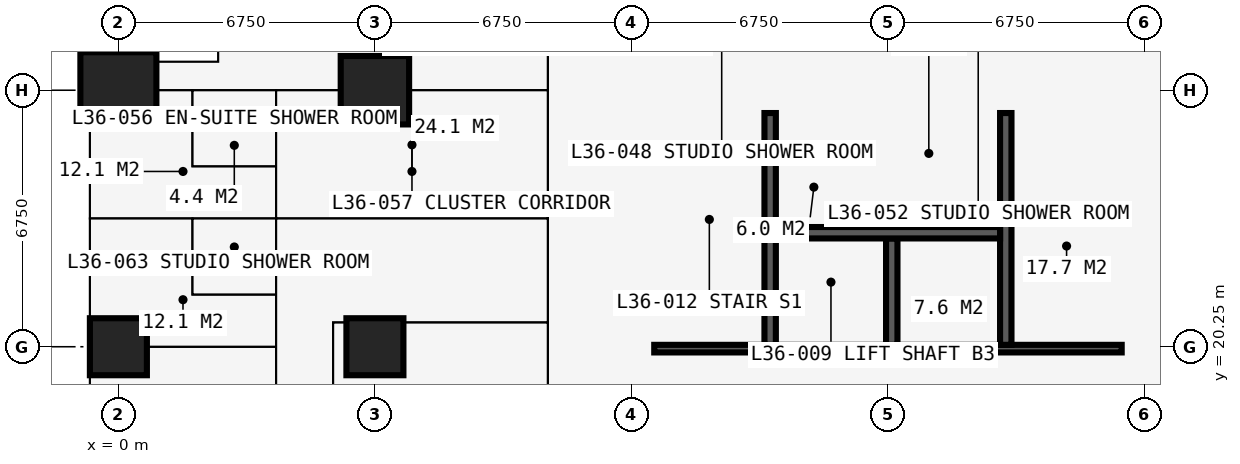
"""IFC4 building model, lengths in metres.
Left out: names, types, materials, properties, quantities, classifications, styles, units other than length and angle.
Written with IfcOpenShell. Run it as: python <this file> out.ifc"""

import sys

from ifc_helpers import new_model, si_unit, direction, frame, frame_2d, origin, origin_2d, place, context, subcontext, project, spatial, rectangle, extrude, element, fill, save


model = new_model("IFC4")
c1 = context("Model", 3, precision=1e-05, world=origin(), true_north=direction((0.0, 1.0)))
c2 = subcontext(c1, "Body", "Model", "MODEL_VIEW")
j1 = project(units=[si_unit("LENGTHUNIT", "METRE"), si_unit("PLANEANGLEUNIT", "RADIAN")], contexts=[c1])
p1 = place(None, origin())
s1 = spatial("IfcSite", under=j1, at=p1, CompositionType="ELEMENT")
p2 = place(p1, origin())
s2 = spatial("IfcBuilding", under=s1, at=p2, CompositionType="ELEMENT")
p3 = place(p2, frame((0.0, 0.0, 134.1)))
s3 = spatial("IfcBuildingStorey", under=s2, at=p3, CompositionType="ELEMENT", Elevation=134.1)
p4 = place(p3, frame((0.0, 20.25, 0.0), z_axis=(0.0, 0.0, 1.0), x_axis=(1.0, 0.0, 0.0)))
e1 = element("IfcColumn", 1, at=p4, inside=s3, PredefinedType="COLUMN", context=c2, shape_type="SweptSolid", body=[
    extrude(rectangle(XDim=1.5, YDim=1.5, at=origin_2d()), origin(), (0.0, 0.0, 1.0), 3.6),
])
p5 = place(p3, frame((0.0, 27.0, 0.0), z_axis=(0.0, 0.0, 1.0), x_axis=(1.0, 0.0, 0.0)))
e2 = element("IfcColumn", 2, at=p5, inside=s3, PredefinedType="COLUMN", context=c2, shape_type="SweptSolid", body=[
    extrude(rectangle(XDim=2.0, YDim=2.0, at=origin_2d()), origin(), (0.0, 0.0, 1.0), 3.6),
])
p6 = place(p3, frame((6.75, 20.25, 0.0), z_axis=(0.0, 0.0, 1.0), x_axis=(1.0, 0.0, 0.0)))
e3 = element("IfcColumn", 3, at=p6, inside=s3, PredefinedType="COLUMN", context=c2, shape_type="SweptSolid", body=[
    extrude(rectangle(XDim=1.5, YDim=1.5, at=origin_2d()), origin(), (0.0, 0.0, 1.0), 3.6),
])
p7 = place(p3, frame((6.75, 27.0, 0.0), z_axis=(0.0, 0.0, 1.0), x_axis=(1.0, 0.0, 0.0)))
e4 = element("IfcColumn", 4, at=p7, inside=s3, PredefinedType="COLUMN", context=c2, shape_type="SweptSolid", body=[
    extrude(rectangle(XDim=1.8, YDim=1.8, at=origin_2d()), origin(), (0.0, 0.0, 1.0), 3.6),
])
p8 = place(p3, frame((27.0, 14.1, 0.0), z_axis=(0.0, 0.0, 1.0), x_axis=(0.0, 1.0, 0.0)))
e5 = element("IfcWall", 5, at=p8, inside=s3, PredefinedType="SHEAR", context=c2, shape_type="SweptSolid", body=[
    extrude(rectangle(XDim=12.3, YDim=1.2, at=frame_2d((6.15, 0.0))), origin(), (0.0, 0.0, 1.0), 3.6),
])
p9 = place(p8, frame((3.65, 0.0, 0.0)))
e6 = element("IfcOpeningElement", 6, at=p9, cuts=e5, PredefinedType="OPENING", context=c2, shape_type="SweptSolid", body=[
    extrude(rectangle(XDim=1.2, YDim=2.2, at=frame_2d((0.6, 1.1))), frame((0.0, 0.61, 0.0), z_axis=(0.0, -1.0, 0.0), x_axis=(1.0, 0.0, 0.0)), (0.0, 0.0, 1.0), 1.22),
])
p10 = place(p3, frame((27.6, 27.0, 0.0), z_axis=(0.0, 0.0, 1.0), x_axis=(-1.0, 0.0, 0.0)))
e7 = element("IfcWall", 7, at=p10, inside=s3, PredefinedType="SHEAR", context=c2, shape_type="SweptSolid", body=[
    extrude(rectangle(XDim=14.7, YDim=1.2, at=frame_2d((7.35, 0.0))), origin(), (0.0, 0.0, 1.0), 3.6),
])
p11 = place(p10, frame((5.225, 0.0, 0.0)))
e8 = element("IfcOpeningElement", 8, at=p11, cuts=e7, PredefinedType="OPENING", context=c2, shape_type="SweptSolid", body=[
    extrude(rectangle(XDim=0.9, YDim=2.2, at=frame_2d((0.45, 1.1))), frame((0.0, 0.61, 0.0), z_axis=(0.0, -1.0, 0.0), x_axis=(1.0, 0.0, 0.0)), (0.0, 0.0, 1.0), 1.22),
])
p12 = place(p10, frame((8.2, 0.0, 0.0)))
e9 = element("IfcOpeningElement", 9, at=p12, cuts=e7, PredefinedType="OPENING", context=c2, shape_type="SweptSolid", body=[
    extrude(rectangle(XDim=1.0, YDim=2.2, at=frame_2d((0.5, 1.1))), frame((0.0, 0.61, 0.0), z_axis=(0.0, -1.0, 0.0), x_axis=(1.0, 0.0, 0.0)), (0.0, 0.0, 1.0), 1.22),
])
p13 = place(p3, frame((13.5, 26.4, 0.0), z_axis=(0.0, 0.0, 1.0), x_axis=(0.0, -1.0, 0.0)))
e10 = element("IfcWall", 10, at=p13, inside=s3, PredefinedType="SHEAR", context=c2, shape_type="SweptSolid", body=[
    extrude(rectangle(XDim=12.3, YDim=1.2, at=frame_2d((6.15, 0.0))), origin(), (0.0, 0.0, 1.0), 3.6),
])
p14 = place(p13, frame((7.45, 0.0, 0.0)))
e11 = element("IfcOpeningElement", 11, at=p14, cuts=e10, PredefinedType="OPENING", context=c2, shape_type="SweptSolid", body=[
    extrude(rectangle(XDim=1.2, YDim=2.2, at=frame_2d((0.6, 1.1))), frame((0.0, 0.61, 0.0), z_axis=(0.0, -1.0, 0.0), x_axis=(1.0, 0.0, 0.0)), (0.0, 0.0, 1.0), 1.22),
])
p15 = place(p3, frame((2.625, 31.125, 0.0), z_axis=(0.0, 0.0, 1.0), x_axis=(0.0, -1.0, 0.0)))
e12 = element("IfcWall", 12, at=p15, inside=s3, PredefinedType="SOLIDWALL", context=c2, shape_type="SweptSolid", body=[
    extrude(rectangle(XDim=3.375, YDim=0.3, at=frame_2d((1.688, 0.0))), origin(), (0.0, 0.0, 1.0), 3.3),
])
p16 = place(p15, frame((0.788, 0.0, 0.6)))
e13 = element("IfcOpeningElement", 13, at=p16, cuts=e12, PredefinedType="OPENING", context=c2, shape_type="SweptSolid", body=[
    extrude(rectangle(XDim=1.8, YDim=2.1, at=frame_2d((0.9, 1.05))), frame((0.0, 0.16, 0.0), z_axis=(0.0, -1.0, 0.0), x_axis=(1.0, 0.0, 0.0)), (0.0, 0.0, 1.0), 0.32),
])
p17 = place(p3, frame((2.625, 27.75, 0.0), z_axis=(0.0, 0.0, 1.0), x_axis=(-1.0, 0.0, 0.0)))
e14 = element("IfcWall", 14, at=p17, inside=s3, PredefinedType="SOLIDWALL", context=c2, shape_type="SweptSolid", body=[
    extrude(rectangle(XDim=3.375, YDim=0.3, at=frame_2d((1.688, 0.0))), origin(), (0.0, 0.0, 1.0), 3.3),
])
p18 = place(p17, frame((0.292, 0.0, 0.9)))
e15 = element("IfcOpeningElement", 15, at=p18, cuts=e14, PredefinedType="OPENING", context=c2, shape_type="SweptSolid", body=[
    extrude(rectangle(XDim=1.2, YDim=1.8, at=frame_2d((0.6, 0.9))), frame((0.0, 0.16, 0.0), z_axis=(0.0, -1.0, 0.0), x_axis=(1.0, 0.0, 0.0)), (0.0, 0.0, 1.0), 0.32),
])
p19 = place(p3, frame((14.1, 20.2, 0.0), z_axis=(0.0, 0.0, 1.0), x_axis=(1.0, 0.0, 0.0)))
e16 = element("IfcWall", 16, at=p19, inside=s3, PredefinedType="SHEAR", context=c2, shape_type="SweptSolid", body=[
    extrude(rectangle(XDim=12.3, YDim=0.2, at=frame_2d((6.15, 0.0))), origin(), (0.0, 0.0, 1.0), 3.6),
])
p20 = place(p19, frame((0.35, 0.0, 0.0)))
e17 = element("IfcOpeningElement", 17, at=p20, cuts=e16, PredefinedType="OPENING", context=c2, shape_type="SweptSolid", body=[
    extrude(rectangle(XDim=1.1, YDim=2.2, at=frame_2d((0.55, 1.1))), frame((0.0, 0.11, 0.0), z_axis=(0.0, -1.0, 0.0), x_axis=(1.0, 0.0, 0.0)), (0.0, 0.0, 1.0), 0.22),
])
p21 = place(p19, frame((9.75, 0.0, 0.0)))
e18 = element("IfcOpeningElement", 18, at=p21, cuts=e16, PredefinedType="OPENING", context=c2, shape_type="SweptSolid", body=[
    extrude(rectangle(XDim=1.1, YDim=2.2, at=frame_2d((0.55, 1.1))), frame((0.0, 0.11, 0.0), z_axis=(0.0, -1.0, 0.0), x_axis=(1.0, 0.0, 0.0)), (0.0, 0.0, 1.0), 0.22),
])
for number, where, z_axis, x_axis in (
    (19, (17.15, 20.3, 0.0), (0.0, 0.0, 1.0), (0.0, 1.0, 0.0)),
    (20, (23.35, 20.3, 0.0), (0.0, 0.0, 1.0), (0.0, 1.0, 0.0)),
):
    element("IfcWall", number, at=place(p3, frame(where, z_axis=z_axis, x_axis=x_axis)), inside=s3, PredefinedType="SHEAR", context=c2, shape_type="SweptSolid", body=[
        extrude(rectangle(XDim=6.1, YDim=0.3, at=frame_2d((3.05, 0.0))), origin(), (0.0, 0.0, 1.0), 3.6),
    ])
p22 = place(p3, frame((20.35, 20.3, 0.0), z_axis=(0.0, 0.0, 1.0), x_axis=(0.0, 1.0, 0.0)))
e21 = element("IfcWall", 21, at=p22, inside=s3, PredefinedType="SHEAR", context=c2, shape_type="SweptSolid", body=[
    extrude(rectangle(XDim=2.8, YDim=0.3, at=frame_2d((1.4, 0.0))), origin(), (0.0, 0.0, 1.0), 3.6),
])
p23 = place(p3, frame((17.3, 23.25, 0.0), z_axis=(0.0, 0.0, 1.0), x_axis=(1.0, 0.0, 0.0)))
e22 = element("IfcWall", 22, at=p23, inside=s3, PredefinedType="SHEAR", context=c2, shape_type="SweptSolid", body=[
    extrude(rectangle(XDim=5.9, YDim=0.3, at=frame_2d((2.95, 0.0))), origin(), (0.0, 0.0, 1.0), 3.6),
])
p24 = place(p3, frame((18.875, 16.6, 0.0), z_axis=(0.0, 0.0, 1.0), x_axis=(0.0, 1.0, 0.0)))
e23 = element("IfcWall", 23, at=p24, inside=s3, PredefinedType="PARTITIONING", context=c2, shape_type="SweptSolid", body=[
    extrude(rectangle(XDim=3.5, YDim=0.15, at=frame_2d((1.75, 0.0))), origin(), (0.0, 0.0, 1.0), 3.3),
])
p25 = place(p24, frame((1.15, 0.0, 0.0)))
e24 = element("IfcOpeningElement", 24, at=p25, cuts=e23, PredefinedType="OPENING", context=c2, shape_type="SweptSolid", body=[
    extrude(rectangle(XDim=1.2, YDim=2.2, at=frame_2d((0.6, 1.1))), frame((0.0, 0.085, 0.0), z_axis=(0.0, -1.0, 0.0), x_axis=(1.0, 0.0, 0.0)), (0.0, 0.0, 1.0), 0.17),
])
p26 = place(p3, frame((21.625, 16.6, 0.0), z_axis=(0.0, 0.0, 1.0), x_axis=(0.0, 1.0, 0.0)))
e25 = element("IfcWall", 25, at=p26, inside=s3, PredefinedType="PARTITIONING", context=c2, shape_type="SweptSolid", body=[
    extrude(rectangle(XDim=3.5, YDim=0.15, at=frame_2d((1.75, 0.0))), origin(), (0.0, 0.0, 1.0), 3.3),
])
p27 = place(p26, frame((1.15, 0.0, 0.0)))
e26 = element("IfcOpeningElement", 26, at=p27, cuts=e25, PredefinedType="OPENING", context=c2, shape_type="SweptSolid", body=[
    extrude(rectangle(XDim=1.2, YDim=2.2, at=frame_2d((0.6, 1.1))), frame((0.0, 0.085, 0.0), z_axis=(0.0, -1.0, 0.0), x_axis=(1.0, 0.0, 0.0)), (0.0, 0.0, 1.0), 0.17),
])
p28 = place(p3, frame((20.12, 16.6, 0.0), z_axis=(0.0, 0.0, 1.0), x_axis=(0.0, 1.0, 0.0)))
e27 = element("IfcWall", 27, at=p28, inside=s3, PredefinedType="PARTITIONING", context=c2, shape_type="SweptSolid", body=[
    extrude(rectangle(XDim=3.5, YDim=0.15, at=frame_2d((1.75, 0.0))), origin(), (0.0, 0.0, 1.0), 3.3),
])
p29 = place(p3, frame((19.375, 23.4, 0.0), z_axis=(0.0, 0.0, 1.0), x_axis=(0.0, 1.0, 0.0)))
e28 = element("IfcWall", 28, at=p29, inside=s3, PredefinedType="PARTITIONING", context=c2, shape_type="SweptSolid", body=[
    extrude(rectangle(XDim=3.0, YDim=0.15, at=frame_2d((1.5, 0.0))), origin(), (0.0, 0.0, 1.0), 3.3),
])
p30 = place(p3, frame((19.45, 25.1, 0.0), z_axis=(0.0, 0.0, 1.0), x_axis=(1.0, 0.0, 0.0)))
e29 = element("IfcWall", 29, at=p30, inside=s3, PredefinedType="PARTITIONING", context=c2, shape_type="SweptSolid", body=[
    extrude(rectangle(XDim=3.75, YDim=0.15, at=frame_2d((1.875, 0.0))), origin(), (0.0, 0.0, 1.0), 3.3),
])
p31 = place(p30, frame((1.45, 0.0, 0.0)))
e30 = element("IfcOpeningElement", 30, at=p31, cuts=e29, PredefinedType="OPENING", context=c2, shape_type="SweptSolid", body=[
    extrude(rectangle(XDim=0.9, YDim=2.2, at=frame_2d((0.45, 1.1))), frame((0.0, 0.085, 0.0), z_axis=(0.0, -1.0, 0.0), x_axis=(1.0, 0.0, 0.0)), (0.0, 0.0, 1.0), 0.17),
])
p32 = place(p3, frame((-0.734, 20.25, 0.0), z_axis=(0.0, 0.0, 1.0), x_axis=(1.0, 0.0, 0.0)))
e31 = element("IfcWall", 31, at=p32, inside=s3, PredefinedType="PARTITIONING", context=c2, shape_type="SweptSolid", body=[
    extrude(rectangle(XDim=4.884, YDim=0.175, at=frame_2d((2.442, 0.0))), origin(), (0.0, 0.0, 1.0), 2.802),
])
p33 = place(p3, frame((-0.734, 23.625, 0.0), z_axis=(0.0, 0.0, 1.0), x_axis=(1.0, 0.0, 0.0)))
e32 = element("IfcWall", 32, at=p33, inside=s3, PredefinedType="PARTITIONING", context=c2, shape_type="SweptSolid", body=[
    extrude(rectangle(XDim=12.034, YDim=0.15, at=frame_2d((6.017, 0.0))), origin(), (0.0, 0.0, 1.0), 3.3),
])
p34 = place(p3, frame((-0.734, 27.0, 0.0), z_axis=(0.0, 0.0, 1.0), x_axis=(1.0, 0.0, 0.0)))
e33 = element("IfcWall", 33, at=p34, inside=s3, PredefinedType="PARTITIONING", context=c2, shape_type="SweptSolid", body=[
    extrude(rectangle(XDim=12.034, YDim=0.15, at=frame_2d((6.017, 0.0))), origin(), (0.0, 0.0, 1.0), 2.802),
])
p35 = place(p34, frame((8.434, 0.0, 0.0)))
e34 = element("IfcOpeningElement", 34, at=p35, cuts=e33, PredefinedType="OPENING", context=c2, shape_type="SweptSolid", body=[
    extrude(rectangle(XDim=1.0, YDim=2.2, at=frame_2d((0.5, 1.1))), frame((0.0, 0.085, 0.0), z_axis=(0.0, -1.0, 0.0), x_axis=(1.0, 0.0, 0.0)), (0.0, 0.0, 1.0), 0.17),
])
p36 = place(p3, frame((1.95, 21.625, 0.0), z_axis=(0.0, 0.0, 1.0), x_axis=(0.0, 1.0, 0.0)))
e35 = element("IfcWall", 35, at=p36, inside=s3, PredefinedType="PARTITIONING", context=c2, shape_type="SweptSolid", body=[
    extrude(rectangle(XDim=2.0, YDim=0.1, at=frame_2d((1.0, 0.0))), origin(), (0.0, 0.0, 1.0), 3.3),
])
p37 = place(p3, frame((1.95, 21.625, 0.0), z_axis=(0.0, 0.0, 1.0), x_axis=(1.0, 0.0, 0.0)))
e36 = element("IfcWall", 36, at=p37, inside=s3, PredefinedType="PARTITIONING", context=c2, shape_type="SweptSolid", body=[
    extrude(rectangle(XDim=2.2, YDim=0.1, at=frame_2d((1.1, 0.0))), origin(), (0.0, 0.0, 1.0), 3.3),
])
p38 = place(p37, frame((0.65, 0.0, 0.0)))
e37 = element("IfcOpeningElement", 37, at=p38, cuts=e36, PredefinedType="OPENING", context=c2, shape_type="SweptSolid", body=[
    extrude(rectangle(XDim=0.9, YDim=2.2, at=frame_2d((0.45, 1.1))), frame((0.0, 0.06, 0.0), z_axis=(0.0, -1.0, 0.0), x_axis=(1.0, 0.0, 0.0)), (0.0, 0.0, 1.0), 0.12),
])
p39 = place(p3, frame((1.95, 25.0, 0.0), z_axis=(0.0, 0.0, 1.0), x_axis=(0.0, 1.0, 0.0)))
e38 = element("IfcWall", 38, at=p39, inside=s3, PredefinedType="PARTITIONING", context=c2, shape_type="SweptSolid", body=[
    extrude(rectangle(XDim=2.0, YDim=0.1, at=frame_2d((1.0, 0.0))), origin(), (0.0, 0.0, 1.0), 3.3),
])
p40 = place(p3, frame((1.95, 25.0, 0.0), z_axis=(0.0, 0.0, 1.0), x_axis=(1.0, 0.0, 0.0)))
e39 = element("IfcWall", 39, at=p40, inside=s3, PredefinedType="PARTITIONING", context=c2, shape_type="SweptSolid", body=[
    extrude(rectangle(XDim=2.2, YDim=0.1, at=frame_2d((1.1, 0.0))), origin(), (0.0, 0.0, 1.0), 3.3),
])
p41 = place(p40, frame((0.65, 0.0, 0.0)))
e40 = element("IfcOpeningElement", 40, at=p41, cuts=e39, PredefinedType="OPENING", context=c2, shape_type="SweptSolid", body=[
    extrude(rectangle(XDim=0.9, YDim=2.2, at=frame_2d((0.45, 1.1))), frame((0.0, 0.06, 0.0), z_axis=(0.0, -1.0, 0.0), x_axis=(1.0, 0.0, 0.0)), (0.0, 0.0, 1.0), 0.12),
])
p42 = place(p3, frame((4.15, 10.125, 0.0), z_axis=(0.0, 0.0, 1.0), x_axis=(0.0, 1.0, 0.0)))
e41 = element("IfcWall", 41, at=p42, inside=s3, PredefinedType="PARTITIONING", context=c2, shape_type="SweptSolid", body=[
    extrude(rectangle(XDim=16.875, YDim=0.15, at=frame_2d((8.438, 0.0))), origin(), (0.0, 0.0, 1.0), 3.3),
])
p43 = place(p42, frame((13.7, 0.0, 0.0)))
e42 = element("IfcOpeningElement", 42, at=p43, cuts=e41, PredefinedType="OPENING", context=c2, shape_type="SweptSolid", body=[
    extrude(rectangle(XDim=0.95, YDim=2.2, at=frame_2d((0.475, 1.1))), frame((0.0, 0.085, 0.0), z_axis=(0.0, -1.0, 0.0), x_axis=(1.0, 0.0, 0.0)), (0.0, 0.0, 1.0), 0.17),
])
p44 = place(p42, frame((7.575, 0.0, 0.0)))
e43 = element("IfcOpeningElement", 43, at=p44, cuts=e41, PredefinedType="OPENING", context=c2, shape_type="SweptSolid", body=[
    extrude(rectangle(XDim=0.95, YDim=2.2, at=frame_2d((0.475, 1.1))), frame((0.0, 0.085, 0.0), z_axis=(0.0, -1.0, 0.0), x_axis=(1.0, 0.0, 0.0)), (0.0, 0.0, 1.0), 0.17),
])
p45 = place(p42, frame((0.2, 0.0, 0.0)))
e44 = element("IfcOpeningElement", 44, at=p45, cuts=e41, PredefinedType="OPENING", context=c2, shape_type="SweptSolid", body=[
    extrude(rectangle(XDim=0.95, YDim=2.2, at=frame_2d((0.475, 1.1))), frame((0.0, 0.085, 0.0), z_axis=(0.0, -1.0, 0.0), x_axis=(1.0, 0.0, 0.0)), (0.0, 0.0, 1.0), 0.17),
])
p46 = place(p42, frame((10.375, 0.0, 0.0)))
e45 = element("IfcOpeningElement", 45, at=p46, cuts=e41, PredefinedType="OPENING", context=c2, shape_type="SweptSolid", body=[
    extrude(rectangle(XDim=0.95, YDim=2.2, at=frame_2d((0.475, 1.1))), frame((0.0, 0.085, 0.0), z_axis=(0.0, -1.0, 0.0), x_axis=(1.0, 0.0, 0.0)), (0.0, 0.0, 1.0), 0.17),
])
p47 = place(p3, frame((5.65, 10.125, 0.0), z_axis=(0.0, 0.0, 1.0), x_axis=(0.0, 1.0, 0.0)))
e46 = element("IfcWall", 46, at=p47, inside=s3, PredefinedType="PARTITIONING", context=c2, shape_type="SweptSolid", body=[
    extrude(rectangle(XDim=10.762, YDim=0.15, at=frame_2d((5.381, 0.0))), origin(), (0.0, 0.0, 1.0), 3.3),
])
p48 = place(p47, frame((4.9, 0.0, 0.0)))
e47 = element("IfcOpeningElement", 47, at=p48, cuts=e46, PredefinedType="OPENING", context=c2, shape_type="SweptSolid", body=[
    extrude(rectangle(XDim=0.95, YDim=2.2, at=frame_2d((0.475, 1.1))), frame((0.0, 0.085, 0.0), z_axis=(0.0, -1.0, 0.0), x_axis=(1.0, 0.0, 0.0)), (0.0, 0.0, 1.0), 0.17),
])
p49 = place(p3, frame((5.65, 20.887, 0.0), z_axis=(0.0, 0.0, 1.0), x_axis=(1.0, 0.0, 0.0)))
e48 = element("IfcWall", 48, at=p49, inside=s3, PredefinedType="PARTITIONING", context=c2, shape_type="SweptSolid", body=[
    extrude(rectangle(XDim=5.65, YDim=0.15, at=frame_2d((2.825, 0.0))), origin(), (0.0, 0.0, 1.0), 3.3),
])
p50 = place(p3, frame((11.3, 11.3, 0.0), z_axis=(0.0, 0.0, 1.0), x_axis=(0.0, 1.0, 0.0)))
e49 = element("IfcWall", 49, at=p50, inside=s3, PredefinedType="PARTITIONING", context=c2, shape_type="SweptSolid", body=[
    extrude(rectangle(XDim=19.3, YDim=0.15, at=frame_2d((9.65, 0.0))), origin(), (0.0, 0.0, 1.0), 3.3),
])
p51 = place(p50, frame((13.525, 0.0, 0.0)))
e50 = element("IfcOpeningElement", 50, at=p51, cuts=e49, PredefinedType="OPENING", context=c2, shape_type="SweptSolid", body=[
    extrude(rectangle(XDim=1.0, YDim=2.2, at=frame_2d((0.5, 1.1))), frame((0.0, 0.085, 0.0), z_axis=(0.0, -1.0, 0.0), x_axis=(1.0, 0.0, 0.0)), (0.0, 0.0, 1.0), 0.17),
])
p52 = place(p50, frame((10.438, 0.0, 0.0)))
e51 = element("IfcOpeningElement", 51, at=p52, cuts=e49, PredefinedType="OPENING", context=c2, shape_type="SweptSolid", body=[
    extrude(rectangle(XDim=1.0, YDim=2.2, at=frame_2d((0.5, 1.1))), frame((0.0, 0.085, 0.0), z_axis=(0.0, -1.0, 0.0), x_axis=(1.0, 0.0, 0.0)), (0.0, 0.0, 1.0), 0.17),
])
p53 = place(p18, origin())
e52 = element("IfcWindow", 52, at=p53, inside=s3, PartitioningType="SINGLE_PANEL", PredefinedType="WINDOW", context=c2, shape_type="SweptSolid", body=[
    extrude(rectangle(XDim=1.2, YDim=1.8, at=frame_2d((0.6, 0.9))), frame((0.0, 0.03, 0.0), z_axis=(0.0, -1.0, 0.0), x_axis=(1.0, 0.0, 0.0)), (0.0, 0.0, 1.0), 0.06),
])
fill(e15, e52)
p54 = place(p31, origin())
e53 = element("IfcDoor", 53, at=p54, inside=s3, OperationType="SINGLE_SWING_RIGHT", PredefinedType="DOOR", context=c2, shape_type="SweptSolid", body=[
    extrude(rectangle(XDim=0.9, YDim=2.2, at=frame_2d((0.45, 1.1))), frame((0.0, 0.025, 0.0), z_axis=(0.0, -1.0, 0.0), x_axis=(1.0, 0.0, 0.0)), (0.0, 0.0, 1.0), 0.05),
])
fill(e30, e53)
p55 = place(p11, origin())
e54 = element("IfcDoor", 54, at=p55, inside=s3, OperationType="SINGLE_SWING_LEFT", PredefinedType="DOOR", context=c2, shape_type="SweptSolid", body=[
    extrude(rectangle(XDim=0.9, YDim=2.2, at=frame_2d((0.45, 1.1))), frame((0.0, 0.4, 0.0), z_axis=(0.0, -1.0, 0.0), x_axis=(1.0, 0.0, 0.0)), (0.0, 0.0, 1.0), 0.8),
])
fill(e8, e54)
p56 = place(p12, origin())
e55 = element("IfcDoor", 55, at=p56, inside=s3, OperationType="SINGLE_SWING_LEFT", PredefinedType="DOOR", context=c2, shape_type="SweptSolid", body=[
    extrude(rectangle(XDim=1.0, YDim=2.2, at=frame_2d((0.5, 1.1))), frame((0.0, 0.025, 0.0), z_axis=(0.0, -1.0, 0.0), x_axis=(1.0, 0.0, 0.0)), (0.0, 0.0, 1.0), 0.05),
])
fill(e9, e55)
p57 = place(p20, origin())
e56 = element("IfcDoor", 56, at=p57, inside=s3, OperationType="SINGLE_SWING_LEFT", PredefinedType="DOOR", context=c2, shape_type="SweptSolid", body=[
    extrude(rectangle(XDim=1.1, YDim=2.2, at=frame_2d((0.55, 1.1))), frame((0.0, 0.025, 0.0), z_axis=(0.0, -1.0, 0.0), x_axis=(1.0, 0.0, 0.0)), (0.0, 0.0, 1.0), 0.05),
])
fill(e17, e56)
p58 = place(p21, origin())
e57 = element("IfcDoor", 57, at=p58, inside=s3, OperationType="SINGLE_SWING_LEFT", PredefinedType="DOOR", context=c2, shape_type="SweptSolid", body=[
    extrude(rectangle(XDim=1.1, YDim=2.2, at=frame_2d((0.55, 1.1))), frame((0.0, 0.025, 0.0), z_axis=(0.0, -1.0, 0.0), x_axis=(1.0, 0.0, 0.0)), (0.0, 0.0, 1.0), 0.05),
])
fill(e18, e57)
p59 = place(p35, origin())
e58 = element("IfcDoor", 58, at=p59, inside=s3, OperationType="SINGLE_SWING_LEFT", PredefinedType="DOOR", context=c2, shape_type="SweptSolid", body=[
    extrude(rectangle(XDim=1.0, YDim=2.2, at=frame_2d((0.5, 1.1))), frame((0.0, 0.025, 0.0), z_axis=(0.0, -1.0, 0.0), x_axis=(1.0, 0.0, 0.0)), (0.0, 0.0, 1.0), 0.05),
])
fill(e34, e58)
p60 = place(p43, origin())
e59 = element("IfcDoor", 59, at=p60, inside=s3, OperationType="SINGLE_SWING_LEFT", PredefinedType="DOOR", context=c2, shape_type="SweptSolid", body=[
    extrude(rectangle(XDim=0.95, YDim=2.2, at=frame_2d((0.475, 1.1))), frame((0.0, 0.025, 0.0), z_axis=(0.0, -1.0, 0.0), x_axis=(1.0, 0.0, 0.0)), (0.0, 0.0, 1.0), 0.05),
])
fill(e42, e59)
p61 = place(p41, origin())
e60 = element("IfcDoor", 60, at=p61, inside=s3, OperationType="SINGLE_SWING_RIGHT", PredefinedType="DOOR", context=c2, shape_type="SweptSolid", body=[
    extrude(rectangle(XDim=0.9, YDim=2.2, at=frame_2d((0.45, 1.1))), frame((0.0, 0.025, 0.0), z_axis=(0.0, -1.0, 0.0), x_axis=(1.0, 0.0, 0.0)), (0.0, 0.0, 1.0), 0.05),
])
fill(e40, e60)
p62 = place(p51, origin())
e61 = element("IfcDoor", 61, at=p62, inside=s3, OperationType="SINGLE_SWING_LEFT", PredefinedType="DOOR", context=c2, shape_type="SweptSolid", body=[
    extrude(rectangle(XDim=1.0, YDim=2.2, at=frame_2d((0.5, 1.1))), frame((0.0, 0.025, 0.0), z_axis=(0.0, -1.0, 0.0), x_axis=(1.0, 0.0, 0.0)), (0.0, 0.0, 1.0), 0.05),
])
fill(e50, e61)
p63 = place(p46, origin())
e62 = element("IfcDoor", 62, at=p63, inside=s3, OperationType="SINGLE_SWING_LEFT", PredefinedType="DOOR", context=c2, shape_type="SweptSolid", body=[
    extrude(rectangle(XDim=0.95, YDim=2.2, at=frame_2d((0.475, 1.1))), frame((0.0, 0.025, 0.0), z_axis=(0.0, -1.0, 0.0), x_axis=(1.0, 0.0, 0.0)), (0.0, 0.0, 1.0), 0.05),
])
fill(e45, e62)
p64 = place(p38, origin())
e63 = element("IfcDoor", 63, at=p64, inside=s3, OperationType="SINGLE_SWING_RIGHT", PredefinedType="DOOR", context=c2, shape_type="SweptSolid", body=[
    extrude(rectangle(XDim=0.9, YDim=2.2, at=frame_2d((0.45, 1.1))), frame((0.0, 0.025, 0.0), z_axis=(0.0, -1.0, 0.0), x_axis=(1.0, 0.0, 0.0)), (0.0, 0.0, 1.0), 0.05),
])
fill(e37, e63)
p65 = place(p52, origin())
e64 = element("IfcDoor", 64, at=p65, inside=s3, OperationType="SINGLE_SWING_LEFT", PredefinedType="DOOR", context=c2, shape_type="SweptSolid", body=[
    extrude(rectangle(XDim=1.0, YDim=2.2, at=frame_2d((0.5, 1.1))), frame((0.0, 0.025, 0.0), z_axis=(0.0, -1.0, 0.0), x_axis=(1.0, 0.0, 0.0)), (0.0, 0.0, 1.0), 0.05),
])
fill(e51, e64)
save(model, sys.argv[1])
